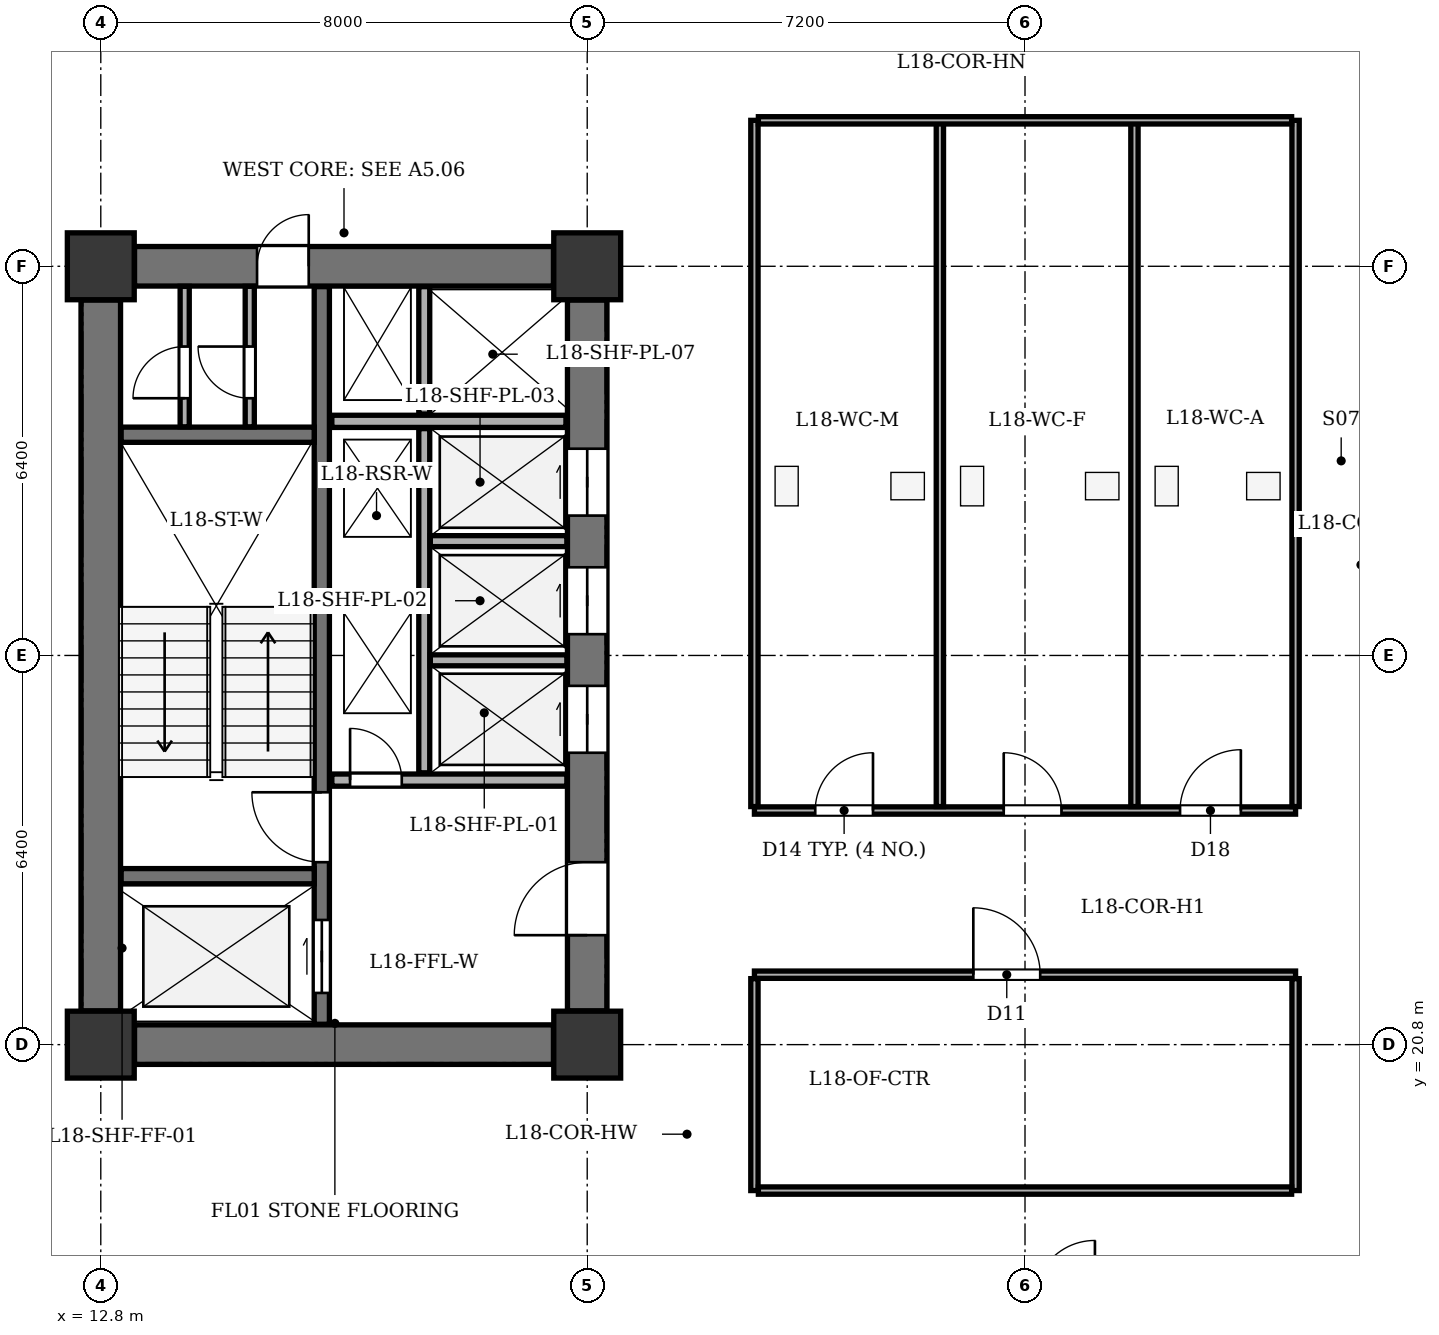
"""IFC4 building model, lengths in metres.
Left out: names, types, materials, properties, quantities, classifications, styles, units other than length and angle.
Written with IfcOpenShell. Run it as: python <this file> out.ifc"""

import sys

from ifc_helpers import new_model, si_unit, direction, frame, frame_2d, origin, origin_2d, place, context, subcontext, project, spatial, rectangle, extrude, element, fill, save


model = new_model("IFC4")
c1 = context("Model", 3, precision=1e-05, world=origin(), true_north=direction((0.0, 1.0)))
c2 = subcontext(c1, "Body", "Model", "MODEL_VIEW")
j1 = project(units=[si_unit("LENGTHUNIT", "METRE"), si_unit("PLANEANGLEUNIT", "RADIAN")], contexts=[c1])
p1 = place(None, origin())
s1 = spatial("IfcSite", under=j1, at=p1, CompositionType="ELEMENT")
p2 = place(p1, origin())
s2 = spatial("IfcBuilding", under=s1, at=p2, CompositionType="ELEMENT")
p3 = place(p2, frame((0.0, 0.0, 75.0)))
s3 = spatial("IfcBuildingStorey", under=s2, at=p3, CompositionType="ELEMENT", Elevation=75.0)
for number, where, z_axis, x_axis in (
    (1, (12.8, 20.8, 0.0), (0.0, 0.0, 1.0), (1.0, 0.0, 0.0)),
    (2, (20.8, 20.8, 0.0), (0.0, 0.0, 1.0), (1.0, 0.0, 0.0)),
    (3, (12.8, 33.6, 0.0), (0.0, 0.0, 1.0), (1.0, 0.0, 0.0)),
    (4, (20.8, 33.6, 0.0), (0.0, 0.0, 1.0), (1.0, 0.0, 0.0)),
):
    element("IfcColumn", number, at=place(p3, frame(where, z_axis=z_axis, x_axis=x_axis)), inside=s3, PredefinedType="COLUMN", context=c2, shape_type="SweptSolid", body=[
        extrude(rectangle(XDim=1.1, YDim=1.1, at=origin_2d()), origin(), (0.0, 0.0, 1.0), 3.9),
    ])
p4 = place(p3, frame((12.8, 21.355, 0.0), z_axis=(0.0, 0.0, 1.0), x_axis=(0.0, 1.0, 0.0)))
e5 = element("IfcWall", 5, at=p4, inside=s3, PredefinedType="SHEAR", context=c2, shape_type="SweptSolid", body=[
    extrude(rectangle(XDim=11.69, YDim=0.65, at=frame_2d((5.845, 0.0))), origin(), (0.0, 0.0, 1.0), 3.6),
])
p5 = place(p3, frame((13.355, 20.8, 0.0), z_axis=(0.0, 0.0, 1.0), x_axis=(1.0, 0.0, 0.0)))
e6 = element("IfcWall", 6, at=p5, inside=s3, PredefinedType="SHEAR", context=c2, shape_type="SweptSolid", body=[
    extrude(rectangle(XDim=6.89, YDim=0.65, at=frame_2d((3.445, 0.0))), origin(), (0.0, 0.0, 1.0), 3.6),
])
p6 = place(p3, frame((13.355, 33.6, 0.0), z_axis=(0.0, 0.0, 1.0), x_axis=(1.0, 0.0, 0.0)))
e7 = element("IfcWall", 7, at=p6, inside=s3, PredefinedType="SHEAR", context=c2, shape_type="SweptSolid", body=[
    extrude(rectangle(XDim=6.89, YDim=0.65, at=frame_2d((3.445, 0.0))), origin(), (0.0, 0.0, 1.0), 3.6),
])
p7 = place(p6, frame((2.015, 0.0, 0.0)))
e8 = element("IfcOpeningElement", 8, at=p7, cuts=e7, PredefinedType="OPENING", context=c2, shape_type="SweptSolid", body=[
    extrude(rectangle(XDim=0.85, YDim=2.02, at=frame_2d((0.425, 1.01))), frame((0.0, 0.335, 0.0), z_axis=(0.0, -1.0, 0.0), x_axis=(1.0, 0.0, 0.0)), (0.0, 0.0, 1.0), 0.67),
])
p8 = place(p3, frame((20.8, 21.355, 0.0), z_axis=(0.0, 0.0, 1.0), x_axis=(0.0, 1.0, 0.0)))
e9 = element("IfcWall", 9, at=p8, inside=s3, PredefinedType="SHEAR", context=c2, shape_type="SweptSolid", body=[
    extrude(rectangle(XDim=11.69, YDim=0.65, at=frame_2d((5.845, 0.0))), origin(), (0.0, 0.0, 1.0), 3.6),
])
p9 = place(p8, frame((1.245, 0.0, 0.0)))
e10 = element("IfcOpeningElement", 10, at=p9, cuts=e9, PredefinedType="OPENING", context=c2, shape_type="SweptSolid", body=[
    extrude(rectangle(XDim=1.2, YDim=2.15, at=frame_2d((0.6, 1.075))), frame((0.0, 0.335, 0.0), z_axis=(0.0, -1.0, 0.0), x_axis=(1.0, 0.0, 0.0)), (0.0, 0.0, 1.0), 0.67),
])
p10 = place(p8, frame((4.245, 0.0, 0.0)))
e11 = element("IfcOpeningElement", 11, at=p10, cuts=e9, PredefinedType="OPENING", context=c2, shape_type="SweptSolid", body=[
    extrude(rectangle(XDim=1.1, YDim=2.1, at=frame_2d((0.55, 1.05))), frame((0.0, 0.335, 0.0), z_axis=(0.0, -1.0, 0.0), x_axis=(1.0, 0.0, 0.0)), (0.0, 0.0, 1.0), 0.67),
])
p11 = place(p8, frame((6.195, 0.0, 0.0)))
e12 = element("IfcOpeningElement", 12, at=p11, cuts=e9, PredefinedType="OPENING", context=c2, shape_type="SweptSolid", body=[
    extrude(rectangle(XDim=1.1, YDim=2.1, at=frame_2d((0.55, 1.05))), frame((0.0, 0.335, 0.0), z_axis=(0.0, -1.0, 0.0), x_axis=(1.0, 0.0, 0.0)), (0.0, 0.0, 1.0), 0.67),
])
p12 = place(p8, frame((8.145, 0.0, 0.0)))
e13 = element("IfcOpeningElement", 13, at=p12, cuts=e9, PredefinedType="OPENING", context=c2, shape_type="SweptSolid", body=[
    extrude(rectangle(XDim=1.1, YDim=2.1, at=frame_2d((0.55, 1.05))), frame((0.0, 0.335, 0.0), z_axis=(0.0, -1.0, 0.0), x_axis=(1.0, 0.0, 0.0)), (0.0, 0.0, 1.0), 0.67),
])
p13 = place(p3, frame((16.435, 21.135, 0.0), z_axis=(0.0, 0.0, 1.0), x_axis=(0.0, 1.0, 0.0)))
e14 = element("IfcWall", 14, at=p13, inside=s3, PredefinedType="SHEAR", context=c2, shape_type="SweptSolid", body=[
    extrude(rectangle(XDim=12.13, YDim=0.25, at=frame_2d((6.065, 0.0))), origin(), (0.0, 0.0, 1.0), 3.6),
])
p14 = place(p13, frame((0.515, 0.0, 0.0)))
e15 = element("IfcOpeningElement", 15, at=p14, cuts=e14, PredefinedType="OPENING", context=c2, shape_type="SweptSolid", body=[
    extrude(rectangle(XDim=1.2, YDim=2.15, at=frame_2d((0.6, 1.075))), frame((0.0, 0.135, 0.0), z_axis=(0.0, -1.0, 0.0), x_axis=(1.0, 0.0, 0.0)), (0.0, 0.0, 1.0), 0.27),
])
p15 = place(p13, frame((2.665, 0.0, 0.0)))
e16 = element("IfcOpeningElement", 16, at=p15, cuts=e14, PredefinedType="OPENING", context=c2, shape_type="SweptSolid", body=[
    extrude(rectangle(XDim=1.15, YDim=2.15, at=frame_2d((0.575, 1.075))), frame((0.0, 0.135, 0.0), z_axis=(0.0, -1.0, 0.0), x_axis=(1.0, 0.0, 0.0)), (0.0, 0.0, 1.0), 0.27),
])
for number, where, z_axis, x_axis in (
    (17, (13.135, 23.57, 0.0), (0.0, 0.0, 1.0), (1.0, 0.0, 0.0)),
    (18, (13.135, 30.83, 0.0), (0.0, 0.0, 1.0), (1.0, 0.0, 0.0)),
):
    element("IfcWall", number, at=place(p3, frame(where, z_axis=z_axis, x_axis=x_axis)), inside=s3, PredefinedType="SHEAR", context=c2, shape_type="SweptSolid", body=[
        extrude(rectangle(XDim=3.175, YDim=0.25, at=frame_2d((1.587, 0.0))), origin(), (0.0, 0.0, 1.0), 3.6),
    ])
p16 = place(p3, frame((16.6, 25.15, 0.0), z_axis=(0.0, 0.0, 1.0), x_axis=(1.0, 0.0, 0.0)))
e19 = element("IfcWall", 19, at=p16, inside=s3, PredefinedType="SOLIDWALL", context=c2, shape_type="SweptSolid", body=[
    extrude(rectangle(XDim=3.865, YDim=0.2, at=frame_2d((1.933, 0.0))), origin(), (0.0, 0.0, 1.0), 3.6),
])
p17 = place(p16, frame((0.3, 0.0, 0.0)))
e20 = element("IfcOpeningElement", 20, at=p17, cuts=e19, PredefinedType="OPENING", context=c2, shape_type="SweptSolid", body=[
    extrude(rectangle(XDim=0.85, YDim=2.02, at=frame_2d((0.425, 1.01))), frame((0.0, 0.11, 0.0), z_axis=(0.0, -1.0, 0.0), x_axis=(1.0, 0.0, 0.0)), (0.0, 0.0, 1.0), 0.22),
])
p18 = place(p3, frame((16.6, 31.05, 0.0), z_axis=(0.0, 0.0, 1.0), x_axis=(1.0, 0.0, 0.0)))
e21 = element("IfcWall", 21, at=p18, inside=s3, PredefinedType="SOLIDWALL", context=c2, shape_type="SweptSolid", body=[
    extrude(rectangle(XDim=3.85, YDim=0.2, at=frame_2d((1.925, 0.0))), origin(), (0.0, 0.0, 1.0), 3.6),
])
p19 = place(p3, frame((18.12, 25.27, 0.0), z_axis=(0.0, 0.0, 1.0), x_axis=(0.0, 1.0, 0.0)))
e22 = element("IfcWall", 22, at=p19, inside=s3, PredefinedType="PARTITIONING", context=c2, shape_type="SweptSolid", body=[
    extrude(rectangle(XDim=5.66, YDim=0.18, at=frame_2d((2.83, 0.0))), origin(), (0.0, 0.0, 1.0), 3.6),
])
p20 = place(p3, frame((18.12, 31.17, 0.0), z_axis=(0.0, 0.0, 1.0), x_axis=(0.0, 1.0, 0.0)))
e23 = element("IfcWall", 23, at=p20, inside=s3, PredefinedType="PARTITIONING", context=c2, shape_type="SweptSolid", body=[
    extrude(rectangle(XDim=2.095, YDim=0.18, at=frame_2d((1.047, 0.0))), origin(), (0.0, 0.0, 1.0), 3.6),
])
for number, where, z_axis, x_axis in (
    (24, (18.22, 27.12, 0.0), (0.0, 0.0, 1.0), (1.0, 0.0, 0.0)),
    (25, (18.22, 29.08, 0.0), (0.0, 0.0, 1.0), (1.0, 0.0, 0.0)),
):
    element("IfcWall", number, at=place(p3, frame(where, z_axis=z_axis, x_axis=x_axis)), inside=s3, PredefinedType="PARTITIONING", context=c2, shape_type="SweptSolid", body=[
        extrude(rectangle(XDim=2.245, YDim=0.18, at=frame_2d((1.123, 0.0))), origin(), (0.0, 0.0, 1.0), 3.6),
    ])
p21 = place(p3, frame((14.18, 30.96, 0.0), z_axis=(0.0, 0.0, 1.0), x_axis=(0.0, 1.0, 0.0)))
e26 = element("IfcWall", 26, at=p21, inside=s3, PredefinedType="PARTITIONING", context=c2, shape_type="SweptSolid", body=[
    extrude(rectangle(XDim=2.31, YDim=0.15, at=frame_2d((1.155, 0.0))), origin(), (0.0, 0.0, 1.0), 3.6),
])
p22 = place(p21, frame((0.47, 0.0, 0.0)))
e27 = element("IfcOpeningElement", 27, at=p22, cuts=e26, PredefinedType="OPENING", context=c2, shape_type="SweptSolid", body=[
    extrude(rectangle(XDim=0.85, YDim=2.02, at=frame_2d((0.425, 1.01))), frame((0.0, 0.085, 0.0), z_axis=(0.0, -1.0, 0.0), x_axis=(1.0, 0.0, 0.0)), (0.0, 0.0, 1.0), 0.17),
])
p23 = place(p3, frame((15.25, 30.96, 0.0), z_axis=(0.0, 0.0, 1.0), x_axis=(0.0, 1.0, 0.0)))
e28 = element("IfcWall", 28, at=p23, inside=s3, PredefinedType="PARTITIONING", context=c2, shape_type="SweptSolid", body=[
    extrude(rectangle(XDim=2.31, YDim=0.15, at=frame_2d((1.155, 0.0))), origin(), (0.0, 0.0, 1.0), 3.6),
])
p24 = place(p23, frame((0.47, 0.0, 0.0)))
e29 = element("IfcOpeningElement", 29, at=p24, cuts=e28, PredefinedType="OPENING", context=c2, shape_type="SweptSolid", body=[
    extrude(rectangle(XDim=0.85, YDim=2.02, at=frame_2d((0.425, 1.01))), frame((0.0, 0.085, 0.0), z_axis=(0.0, -1.0, 0.0), x_axis=(1.0, 0.0, 0.0)), (0.0, 0.0, 1.0), 0.17),
])
p25 = place(p3, frame((23.55, 24.65, 0.0), z_axis=(0.0, 0.0, 1.0), x_axis=(1.0, 0.0, 0.0)))
e30 = element("IfcWall", 30, at=p25, inside=s3, PredefinedType="PARTITIONING", context=c2, shape_type="SweptSolid", body=[
    extrude(rectangle(XDim=8.9, YDim=0.12, at=frame_2d((4.45, 0.0))), origin(), (0.0, 0.0, 1.0), 3.135),
])
p26 = place(p25, frame((1.0, 0.0, 0.0)))
e31 = element("IfcOpeningElement", 31, at=p26, cuts=e30, PredefinedType="OPENING", context=c2, shape_type="SweptSolid", body=[
    extrude(rectangle(XDim=0.95, YDim=2.1, at=frame_2d((0.475, 1.05))), frame((0.0, 0.07, 0.0), z_axis=(0.0, -1.0, 0.0), x_axis=(1.0, 0.0, 0.0)), (0.0, 0.0, 1.0), 0.14),
])
p27 = place(p25, frame((4.1, 0.0, 0.0)))
e32 = element("IfcOpeningElement", 32, at=p27, cuts=e30, PredefinedType="OPENING", context=c2, shape_type="SweptSolid", body=[
    extrude(rectangle(XDim=0.95, YDim=2.1, at=frame_2d((0.475, 1.05))), frame((0.0, 0.07, 0.0), z_axis=(0.0, -1.0, 0.0), x_axis=(1.0, 0.0, 0.0)), (0.0, 0.0, 1.0), 0.14),
])
p28 = place(p25, frame((7.0, 0.0, 0.0)))
e33 = element("IfcOpeningElement", 33, at=p28, cuts=e30, PredefinedType="OPENING", context=c2, shape_type="SweptSolid", body=[
    extrude(rectangle(XDim=1.0, YDim=2.1, at=frame_2d((0.5, 1.05))), frame((0.0, 0.07, 0.0), z_axis=(0.0, -1.0, 0.0), x_axis=(1.0, 0.0, 0.0)), (0.0, 0.0, 1.0), 0.14),
])
for number, where, z_axis, x_axis in (
    (34, (23.55, 24.715, 0.0), (0.0, 0.0, 1.0), (0.0, 1.0, 0.0)),
    (35, (32.45, 24.715, 0.0), (0.0, 0.0, 1.0), (0.0, 1.0, 0.0)),
    (36, (26.6, 24.715, 0.0), (0.0, 0.0, 1.0), (0.0, 1.0, 0.0)),
):
    element("IfcWall", number, at=place(p3, frame(where, z_axis=z_axis, x_axis=x_axis)), inside=s3, PredefinedType="PARTITIONING", context=c2, shape_type="SweptSolid", body=[
        extrude(rectangle(XDim=11.285, YDim=0.12, at=frame_2d((5.643, 0.0))), origin(), (0.0, 0.0, 1.0), 3.6),
    ])
p29 = place(p3, frame((29.8, 24.715, 0.0), z_axis=(0.0, 0.0, 1.0), x_axis=(0.0, 1.0, 0.0)))
e37 = element("IfcWall", 37, at=p29, inside=s3, PredefinedType="PARTITIONING", context=c2, shape_type="SweptSolid", body=[
    extrude(rectangle(XDim=11.285, YDim=0.12, at=frame_2d((5.643, 0.0))), origin(), (0.0, 0.0, 1.0), 3.135),
])
p30 = place(p3, frame((23.615, 36.0, 0.0), z_axis=(0.0, 0.0, 1.0), x_axis=(1.0, 0.0, 0.0)))
e38 = element("IfcWall", 38, at=p30, inside=s3, PredefinedType="PARTITIONING", context=c2, shape_type="SweptSolid", body=[
    extrude(rectangle(XDim=8.77, YDim=0.12, at=frame_2d((4.385, 0.0))), origin(), (0.0, 0.0, 1.0), 3.6),
])
p31 = place(p3, frame((23.55, 21.95, 0.0), z_axis=(0.0, 0.0, 1.0), x_axis=(1.0, 0.0, 0.0)))
e39 = element("IfcWall", 39, at=p31, inside=s3, PredefinedType="PARTITIONING", context=c2, shape_type="SweptSolid", body=[
    extrude(rectangle(XDim=8.9, YDim=0.12, at=frame_2d((4.45, 0.0))), origin(), (0.0, 0.0, 1.0), 3.135),
])
p32 = place(p31, frame((3.6, 0.0, 0.0)))
e40 = element("IfcOpeningElement", 40, at=p32, cuts=e39, PredefinedType="OPENING", context=c2, shape_type="SweptSolid", body=[
    extrude(rectangle(XDim=1.1, YDim=2.15, at=frame_2d((0.55, 1.075))), frame((0.0, 0.07, 0.0), z_axis=(0.0, -1.0, 0.0), x_axis=(1.0, 0.0, 0.0)), (0.0, 0.0, 1.0), 0.14),
])
for number, where, z_axis, x_axis in (
    (41, (23.55, 18.4, 0.0), (0.0, 0.0, 1.0), (0.0, 1.0, 0.0)),
    (42, (32.45, 18.4, 0.0), (0.0, 0.0, 1.0), (0.0, 1.0, 0.0)),
):
    element("IfcWall", number, at=place(p3, frame(where, z_axis=z_axis, x_axis=x_axis)), inside=s3, PredefinedType="PARTITIONING", context=c2, shape_type="SweptSolid", body=[
        extrude(rectangle(XDim=3.485, YDim=0.12, at=frame_2d((1.743, 0.0))), origin(), (0.0, 0.0, 1.0), 3.6),
    ])
p33 = place(p3, frame((23.615, 18.4, 0.0), z_axis=(0.0, 0.0, 1.0), x_axis=(1.0, 0.0, 0.0)))
e43 = element("IfcWall", 43, at=p33, inside=s3, PredefinedType="PARTITIONING", context=c2, shape_type="SweptSolid", body=[
    extrude(rectangle(XDim=8.77, YDim=0.12, at=frame_2d((4.385, 0.0))), origin(), (0.0, 0.0, 1.0), 3.6),
])
p34 = place(p7, origin())
e44 = element("IfcDoor", 44, at=p34, inside=s3, OperationType="SINGLE_SWING_RIGHT", PredefinedType="DOOR", context=c2, shape_type="SweptSolid", body=[
    extrude(rectangle(XDim=0.85, YDim=2.02, at=frame_2d((0.425, 1.01))), frame((0.0, 0.025, 0.0), z_axis=(0.0, -1.0, 0.0), x_axis=(1.0, 0.0, 0.0)), (0.0, 0.0, 1.0), 0.05),
])
fill(e8, e44)
p35 = place(p9, origin())
e45 = element("IfcDoor", 45, at=p35, inside=s3, OperationType="SINGLE_SWING_LEFT", PredefinedType="DOOR", context=c2, shape_type="SweptSolid", body=[
    extrude(rectangle(XDim=1.2, YDim=2.15, at=frame_2d((0.6, 1.075))), frame((0.0, 0.025, 0.0), z_axis=(0.0, -1.0, 0.0), x_axis=(1.0, 0.0, 0.0)), (0.0, 0.0, 1.0), 0.05),
])
fill(e10, e45)
p36 = place(p10, origin())
e46 = element("IfcDoor", 46, at=p36, inside=s3, OperationType="DOUBLE_DOOR_SLIDING", PredefinedType="DOOR", context=c2, shape_type="SweptSolid", body=[
    extrude(rectangle(XDim=1.1, YDim=2.1, at=frame_2d((0.55, 1.05))), frame((0.0, 0.025, 0.0), z_axis=(0.0, -1.0, 0.0), x_axis=(1.0, 0.0, 0.0)), (0.0, 0.0, 1.0), 0.05),
])
fill(e11, e46)
p37 = place(p11, origin())
e47 = element("IfcDoor", 47, at=p37, inside=s3, OperationType="DOUBLE_DOOR_SLIDING", PredefinedType="DOOR", context=c2, shape_type="SweptSolid", body=[
    extrude(rectangle(XDim=1.1, YDim=2.1, at=frame_2d((0.55, 1.05))), frame((0.0, 0.025, 0.0), z_axis=(0.0, -1.0, 0.0), x_axis=(1.0, 0.0, 0.0)), (0.0, 0.0, 1.0), 0.05),
])
fill(e12, e47)
p38 = place(p12, origin())
e48 = element("IfcDoor", 48, at=p38, inside=s3, OperationType="DOUBLE_DOOR_SLIDING", PredefinedType="DOOR", context=c2, shape_type="SweptSolid", body=[
    extrude(rectangle(XDim=1.1, YDim=2.1, at=frame_2d((0.55, 1.05))), frame((0.0, 0.025, 0.0), z_axis=(0.0, -1.0, 0.0), x_axis=(1.0, 0.0, 0.0)), (0.0, 0.0, 1.0), 0.05),
])
fill(e13, e48)
p39 = place(p14, origin())
e49 = element("IfcDoor", 49, at=p39, inside=s3, OperationType="DOUBLE_DOOR_SLIDING", PredefinedType="DOOR", context=c2, shape_type="SweptSolid", body=[
    extrude(rectangle(XDim=1.2, YDim=2.15, at=frame_2d((0.6, 1.075))), frame((0.0, 0.025, 0.0), z_axis=(0.0, -1.0, 0.0), x_axis=(1.0, 0.0, 0.0)), (0.0, 0.0, 1.0), 0.05),
])
fill(e15, e49)
p40 = place(p15, origin())
e50 = element("IfcDoor", 50, at=p40, inside=s3, OperationType="SINGLE_SWING_RIGHT", PredefinedType="DOOR", context=c2, shape_type="SweptSolid", body=[
    extrude(rectangle(XDim=1.15, YDim=2.15, at=frame_2d((0.575, 1.075))), frame((0.0, 0.025, 0.0), z_axis=(0.0, -1.0, 0.0), x_axis=(1.0, 0.0, 0.0)), (0.0, 0.0, 1.0), 0.05),
])
fill(e16, e50)
p41 = place(p17, origin())
e51 = element("IfcDoor", 51, at=p41, inside=s3, OperationType="SINGLE_SWING_LEFT", PredefinedType="DOOR", context=c2, shape_type="SweptSolid", body=[
    extrude(rectangle(XDim=0.85, YDim=2.02, at=frame_2d((0.425, 1.01))), frame((0.0, 0.025, 0.0), z_axis=(0.0, -1.0, 0.0), x_axis=(1.0, 0.0, 0.0)), (0.0, 0.0, 1.0), 0.05),
])
fill(e20, e51)
p42 = place(p22, origin())
e52 = element("IfcDoor", 52, at=p42, inside=s3, OperationType="SINGLE_SWING_LEFT", PredefinedType="DOOR", context=c2, shape_type="SweptSolid", body=[
    extrude(rectangle(XDim=0.85, YDim=2.02, at=frame_2d((0.425, 1.01))), frame((0.0, 0.025, 0.0), z_axis=(0.0, -1.0, 0.0), x_axis=(1.0, 0.0, 0.0)), (0.0, 0.0, 1.0), 0.05),
])
fill(e27, e52)
p43 = place(p24, origin())
e53 = element("IfcDoor", 53, at=p43, inside=s3, OperationType="SINGLE_SWING_RIGHT", PredefinedType="DOOR", context=c2, shape_type="SweptSolid", body=[
    extrude(rectangle(XDim=0.85, YDim=2.02, at=frame_2d((0.425, 1.01))), frame((0.0, 0.025, 0.0), z_axis=(0.0, -1.0, 0.0), x_axis=(1.0, 0.0, 0.0)), (0.0, 0.0, 1.0), 0.05),
])
fill(e29, e53)
p44 = place(p26, origin())
e54 = element("IfcDoor", 54, at=p44, inside=s3, OperationType="SINGLE_SWING_RIGHT", PredefinedType="DOOR", context=c2, shape_type="SweptSolid", body=[
    extrude(rectangle(XDim=0.95, YDim=2.1, at=frame_2d((0.475, 1.05))), frame((0.0, 0.025, 0.0), z_axis=(0.0, -1.0, 0.0), x_axis=(1.0, 0.0, 0.0)), (0.0, 0.0, 1.0), 0.05),
])
fill(e31, e54)
p45 = place(p27, origin())
e55 = element("IfcDoor", 55, at=p45, inside=s3, OperationType="SINGLE_SWING_LEFT", PredefinedType="DOOR", context=c2, shape_type="SweptSolid", body=[
    extrude(rectangle(XDim=0.95, YDim=2.1, at=frame_2d((0.475, 1.05))), frame((0.0, 0.025, 0.0), z_axis=(0.0, -1.0, 0.0), x_axis=(1.0, 0.0, 0.0)), (0.0, 0.0, 1.0), 0.05),
])
fill(e32, e55)
p46 = place(p28, origin())
e56 = element("IfcDoor", 56, at=p46, inside=s3, OperationType="SINGLE_SWING_RIGHT", PredefinedType="DOOR", context=c2, shape_type="SweptSolid", body=[
    extrude(rectangle(XDim=1.0, YDim=2.1, at=frame_2d((0.5, 1.05))), frame((0.0, 0.025, 0.0), z_axis=(0.0, -1.0, 0.0), x_axis=(1.0, 0.0, 0.0)), (0.0, 0.0, 1.0), 0.05),
])
fill(e33, e56)
p47 = place(p32, origin())
e57 = element("IfcDoor", 57, at=p47, inside=s3, OperationType="SINGLE_SWING_LEFT", PredefinedType="DOOR", context=c2, shape_type="SweptSolid", body=[
    extrude(rectangle(XDim=1.1, YDim=2.15, at=frame_2d((0.55, 1.075))), frame((0.0, 0.025, 0.0), z_axis=(0.0, -1.0, 0.0), x_axis=(1.0, 0.0, 0.0)), (0.0, 0.0, 1.0), 0.05),
])
fill(e40, e57)
save(model, sys.argv[1])
